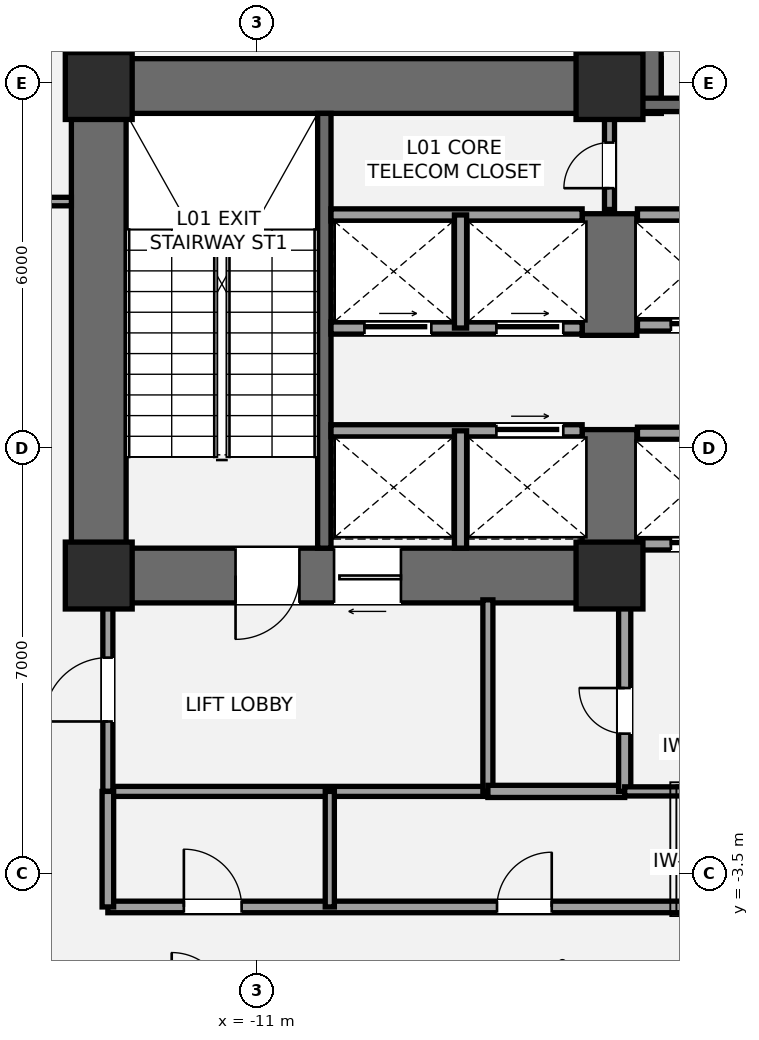
"""IFC4 building model, lengths in metres.
Left out: names, types, materials, properties, quantities, classifications, styles, units other than length and angle.
Written with IfcOpenShell. Run it as: python <this file> out.ifc"""

import sys

from ifc_helpers import new_model, si_unit, direction, frame, frame_2d, origin, origin_2d, place, context, subcontext, project, spatial, rectangle, extrude, element, fill, save


model = new_model("IFC4")
c1 = context("Model", 3, precision=1e-05, world=origin(), true_north=direction((0.0, 1.0)))
c2 = subcontext(c1, "Body", "Model", "MODEL_VIEW")
j1 = project(units=[si_unit("LENGTHUNIT", "METRE"), si_unit("PLANEANGLEUNIT", "RADIAN")], contexts=[c1])
p1 = place(None, origin())
s1 = spatial("IfcSite", under=j1, at=p1, CompositionType="ELEMENT")
p2 = place(p1, origin())
s2 = spatial("IfcBuilding", under=s1, at=p2, CompositionType="ELEMENT")
p3 = place(p2, frame((0.0, 0.0, 6.0)))
s3 = spatial("IfcBuildingStorey", under=s2, at=p3, CompositionType="ELEMENT", Elevation=6.0)
p4 = place(p3, frame((-13.6, 0.95, 0.0), z_axis=(0.0, 0.0, 1.0), x_axis=(0.0, 1.0, 0.0)))
e1 = element("IfcWall", 1, at=p4, inside=s3, PredefinedType="SHEAR", context=c2, shape_type="SweptSolid", body=[
    extrude(rectangle(XDim=8.95, YDim=0.9, at=frame_2d((4.475, 0.0))), origin(), (0.0, 0.0, 1.0), 4.2),
])
p5 = place(p3, frame((-14.05, 9.45, 0.0), z_axis=(0.0, 0.0, 1.0), x_axis=(1.0, 0.0, 0.0)))
e2 = element("IfcWall", 2, at=p5, inside=s3, PredefinedType="SHEAR", context=c2, shape_type="SweptSolid", body=[
    extrude(rectangle(XDim=9.7, YDim=0.9, at=frame_2d((4.85, 0.0))), origin(), (0.0, 0.0, 1.0), 4.2),
])
p6 = place(p3, frame((-4.75, 1.4, 0.0), z_axis=(0.0, 0.0, 1.0), x_axis=(-1.0, 0.0, 0.0)))
e3 = element("IfcWall", 3, at=p6, inside=s3, PredefinedType="SHEAR", context=c2, shape_type="SweptSolid", body=[
    extrude(rectangle(XDim=9.3, YDim=0.9, at=frame_2d((4.65, 0.0))), origin(), (0.0, 0.0, 1.0), 4.2),
])
p7 = place(p6, frame((5.55, 0.0, 0.0)))
e4 = element("IfcOpeningElement", 4, at=p7, cuts=e3, PredefinedType="OPENING", context=c2, shape_type="SweptSolid", body=[
    extrude(rectangle(XDim=1.05, YDim=2.15, at=frame_2d((0.525, 1.075))), frame((0.0, 0.46, 0.0), z_axis=(0.0, -1.0, 0.0), x_axis=(1.0, 0.0, 0.0)), (0.0, 0.0, 1.0), 0.92),
])
p8 = place(p6, frame((3.88, 0.0, 0.0)))
e5 = element("IfcOpeningElement", 5, at=p8, cuts=e3, PredefinedType="OPENING", context=c2, shape_type="SweptSolid", body=[
    extrude(rectangle(XDim=1.1, YDim=2.2, at=frame_2d((0.55, 1.1))), frame((0.0, 0.46, 0.0), z_axis=(0.0, -1.0, 0.0), x_axis=(1.0, 0.0, 0.0)), (0.0, 0.0, 1.0), 0.92),
])
p9 = place(p3, frame((-5.2, 0.95, 0.0), z_axis=(0.0, 0.0, 1.0), x_axis=(0.0, 1.0, 0.0)))
e6 = element("IfcWall", 6, at=p9, inside=s3, PredefinedType="SHEAR", context=c2, shape_type="SweptSolid", body=[
    extrude(rectangle(XDim=2.85, YDim=0.9, at=frame_2d((1.425, 0.0))), origin(), (0.0, 0.0, 1.0), 4.2),
])
p10 = place(p3, frame((-5.2, 5.35, 0.0), z_axis=(0.0, 0.0, 1.0), x_axis=(0.0, 1.0, 0.0)))
e7 = element("IfcWall", 7, at=p10, inside=s3, PredefinedType="SHEAR", context=c2, shape_type="SweptSolid", body=[
    extrude(rectangle(XDim=2.0, YDim=0.9, at=frame_2d((1.0, 0.0))), origin(), (0.0, 0.0, 1.0), 4.2),
])
p11 = place(p3, frame((-9.89, 1.85, 0.0), z_axis=(0.0, 0.0, 1.0), x_axis=(0.0, 1.0, 0.0)))
e8 = element("IfcWall", 8, at=p11, inside=s3, PredefinedType="SHEAR", context=c2, shape_type="SweptSolid", body=[
    extrude(rectangle(XDim=7.15, YDim=0.22, at=frame_2d((3.575, 0.0))), origin(), (0.0, 0.0, 1.0), 4.2),
])
p12 = place(p3, frame((-4.8, 9.0, 0.0), z_axis=(0.0, 0.0, 1.0), x_axis=(0.0, 1.0, 0.0)))
e9 = element("IfcWall", 9, at=p12, inside=s3, PredefinedType="SHEAR", context=c2, shape_type="SweptSolid", body=[
    extrude(rectangle(XDim=4.3, YDim=0.9, at=frame_2d((2.15, 0.0))), origin(), (0.0, 0.0, 1.0), 4.2),
])
p13 = place(p3, frame((-4.7, 9.14, 0.0), z_axis=(0.0, 0.0, 1.0), x_axis=(1.0, 0.0, 0.0)))
e10 = element("IfcWall", 10, at=p13, inside=s3, PredefinedType="SHEAR", context=c2, shape_type="SweptSolid", body=[
    extrude(rectangle(XDim=9.3, YDim=0.22, at=frame_2d((4.65, 0.0))), origin(), (0.0, 0.0, 1.0), 4.2),
])
p14 = place(p13, frame((1.15, 0.0, 0.0)))
e11 = element("IfcOpeningElement", 11, at=p14, cuts=e10, PredefinedType="OPENING", context=c2, shape_type="SweptSolid", body=[
    extrude(rectangle(XDim=1.05, YDim=2.15, at=frame_2d((0.525, 1.075))), frame((0.0, 0.12, 0.0), z_axis=(0.0, -1.0, 0.0), x_axis=(1.0, 0.0, 0.0)), (0.0, 0.0, 1.0), 0.24),
])
for number, where, z_axis, x_axis in (
    (12, (-13.6, 1.4, 0.0), (0.0, 0.0, 1.0), (1.0, 0.0, 0.0)),
    (13, (-13.6, 9.45, 0.0), (0.0, 0.0, 1.0), (1.0, 0.0, 0.0)),
    (14, (-5.2, 1.4, 0.0), (0.0, 0.0, 1.0), (1.0, 0.0, 0.0)),
    (15, (-5.2, 9.45, 0.0), (0.0, 0.0, 1.0), (1.0, 0.0, 0.0)),
):
    element("IfcColumn", number, at=place(p3, frame(where, z_axis=z_axis, x_axis=x_axis)), inside=s3, PredefinedType="COLUMN", context=c2, shape_type="SweptSolid", body=[
        extrude(rectangle(XDim=1.1, YDim=1.1, at=origin_2d()), origin(), (0.0, 0.0, 1.0), 4.2),
    ])
p15 = place(p3, frame((-13.45, -2.15, 0.0), z_axis=(0.0, 0.0, 1.0), x_axis=(1.0, 0.0, 0.0)))
e16 = element("IfcWall", 16, at=p15, inside=s3, PredefinedType="PARTITIONING", context=c2, shape_type="SweptSolid", body=[
    extrude(rectangle(XDim=6.25, YDim=0.165, at=frame_2d((3.125, 0.0))), origin(), (0.0, 0.0, 1.0), 3.98),
])
p16 = place(p3, frame((-13.45, -2.15, 0.0), z_axis=(0.0, 0.0, 1.0), x_axis=(0.0, 1.0, 0.0)))
e17 = element("IfcWall", 17, at=p16, inside=s3, PredefinedType="PARTITIONING", context=c2, shape_type="SweptSolid", body=[
    extrude(rectangle(XDim=3.15, YDim=0.165, at=frame_2d((1.575, 0.0))), origin(), (0.0, 0.0, 1.0), 3.433),
])
p17 = place(p16, frame((1.15, 0.0, 0.0)))
e18 = element("IfcOpeningElement", 18, at=p17, cuts=e17, PredefinedType="OPENING", context=c2, shape_type="SweptSolid", body=[
    extrude(rectangle(XDim=1.05, YDim=2.15, at=frame_2d((0.525, 1.075))), frame((0.0, 0.093, 0.0), z_axis=(0.0, -1.0, 0.0), x_axis=(1.0, 0.0, 0.0)), (0.0, 0.0, 1.0), 0.185),
])
p18 = place(p3, frame((-7.2, -2.15, 0.0), z_axis=(0.0, 0.0, 1.0), x_axis=(0.0, 1.0, 0.0)))
e19 = element("IfcWall", 19, at=p18, inside=s3, PredefinedType="PARTITIONING", context=c2, shape_type="SweptSolid", body=[
    extrude(rectangle(XDim=3.15, YDim=0.165, at=frame_2d((1.575, 0.0))), origin(), (0.0, 0.0, 1.0), 3.98),
])
p19 = place(p3, frame((-7.2, -2.15, 0.0), z_axis=(0.0, 0.0, 1.0), x_axis=(1.0, 0.0, 0.0)))
e20 = element("IfcWall", 20, at=p19, inside=s3, PredefinedType="SOLIDWALL", context=c2, shape_type="SweptSolid", body=[
    extrude(rectangle(XDim=2.25, YDim=0.2, at=frame_2d((1.125, 0.0))), origin(), (0.0, 0.0, 1.0), 3.98),
])
p20 = place(p3, frame((-4.95, -2.15, 0.0), z_axis=(0.0, 0.0, 1.0), x_axis=(0.0, 1.0, 0.0)))
e21 = element("IfcWall", 21, at=p20, inside=s3, PredefinedType="SOLIDWALL", context=c2, shape_type="SweptSolid", body=[
    extrude(rectangle(XDim=3.15, YDim=0.2, at=frame_2d((1.575, 0.0))), origin(), (0.0, 0.0, 1.0), 3.348),
])
p21 = place(p20, frame((0.95, 0.0, 0.0)))
e22 = element("IfcOpeningElement", 22, at=p21, cuts=e21, PredefinedType="OPENING", context=c2, shape_type="SweptSolid", body=[
    extrude(rectangle(XDim=0.75, YDim=2.1, at=frame_2d((0.375, 1.05))), frame((0.0, 0.11, 0.0), z_axis=(0.0, -1.0, 0.0), x_axis=(1.0, 0.0, 0.0)), (0.0, 0.0, 1.0), 0.22),
])
p22 = place(p3, frame((-9.78, 3.78, 0.0), z_axis=(0.0, 0.0, 1.0), x_axis=(1.0, 0.0, 0.0)))
e23 = element("IfcWall", 23, at=p22, inside=s3, PredefinedType="SOLIDWALL", context=c2, shape_type="SweptSolid", body=[
    extrude(rectangle(XDim=4.13, YDim=0.2, at=frame_2d((2.065, 0.0))), origin(), (0.0, 0.0, 1.0), 3.98),
])
p23 = place(p22, frame((2.72, 0.0, 0.0)))
e24 = element("IfcOpeningElement", 24, at=p23, cuts=e23, PredefinedType="OPENING", context=c2, shape_type="SweptSolid", body=[
    extrude(rectangle(XDim=1.1, YDim=2.2, at=frame_2d((0.55, 1.1))), frame((0.0, 0.11, 0.0), z_axis=(0.0, -1.0, 0.0), x_axis=(1.0, 0.0, 0.0)), (0.0, 0.0, 1.0), 0.22),
])
p24 = place(p3, frame((-7.65, 1.85, 0.0), z_axis=(0.0, 0.0, 1.0), x_axis=(0.0, 1.0, 0.0)))
e25 = element("IfcWall", 25, at=p24, inside=s3, PredefinedType="SOLIDWALL", context=c2, shape_type="SweptSolid", body=[
    extrude(rectangle(XDim=1.93, YDim=0.2, at=frame_2d((0.965, 0.0))), origin(), (0.0, 0.0, 1.0), 3.98),
])
p25 = place(p3, frame((-9.78, 5.47, 0.0), z_axis=(0.0, 0.0, 1.0), x_axis=(1.0, 0.0, 0.0)))
e26 = element("IfcWall", 26, at=p25, inside=s3, PredefinedType="SOLIDWALL", context=c2, shape_type="SweptSolid", body=[
    extrude(rectangle(XDim=4.13, YDim=0.2, at=frame_2d((2.065, 0.0))), origin(), (0.0, 0.0, 1.0), 3.98),
])
p26 = place(p25, frame((0.55, 0.0, 0.0)))
e27 = element("IfcOpeningElement", 27, at=p26, cuts=e26, PredefinedType="OPENING", context=c2, shape_type="SweptSolid", body=[
    extrude(rectangle(XDim=1.1, YDim=2.2, at=frame_2d((0.55, 1.1))), frame((0.0, 0.11, 0.0), z_axis=(0.0, -1.0, 0.0), x_axis=(1.0, 0.0, 0.0)), (0.0, 0.0, 1.0), 0.22),
])
p27 = place(p25, frame((2.72, 0.0, 0.0)))
e28 = element("IfcOpeningElement", 28, at=p27, cuts=e26, PredefinedType="OPENING", context=c2, shape_type="SweptSolid", body=[
    extrude(rectangle(XDim=1.1, YDim=2.2, at=frame_2d((0.55, 1.1))), frame((0.0, 0.11, 0.0), z_axis=(0.0, -1.0, 0.0), x_axis=(1.0, 0.0, 0.0)), (0.0, 0.0, 1.0), 0.22),
])
p28 = place(p3, frame((-9.78, 7.33, 0.0), z_axis=(0.0, 0.0, 1.0), x_axis=(1.0, 0.0, 0.0)))
e29 = element("IfcWall", 29, at=p28, inside=s3, PredefinedType="SOLIDWALL", context=c2, shape_type="SweptSolid", body=[
    extrude(rectangle(XDim=4.13, YDim=0.2, at=frame_2d((2.065, 0.0))), origin(), (0.0, 0.0, 1.0), 3.98),
])
p29 = place(p3, frame((-7.65, 5.47, 0.0), z_axis=(0.0, 0.0, 1.0), x_axis=(0.0, 1.0, 0.0)))
e30 = element("IfcWall", 30, at=p29, inside=s3, PredefinedType="SOLIDWALL", context=c2, shape_type="SweptSolid", body=[
    extrude(rectangle(XDim=1.86, YDim=0.2, at=frame_2d((0.93, 0.0))), origin(), (0.0, 0.0, 1.0), 3.98),
])
p30 = place(p3, frame((-4.74, 1.92, 0.0), z_axis=(0.0, 0.0, 1.0), x_axis=(1.0, 0.0, 0.0)))
e31 = element("IfcWall", 31, at=p30, inside=s3, PredefinedType="SOLIDWALL", context=c2, shape_type="SweptSolid", body=[
    extrude(rectangle(XDim=3.86, YDim=0.2, at=frame_2d((1.93, 0.0))), origin(), (0.0, 0.0, 1.0), 2.97),
])
p31 = place(p30, frame((0.55, 0.0, 0.0)))
e32 = element("IfcOpeningElement", 32, at=p31, cuts=e31, PredefinedType="OPENING", context=c2, shape_type="SweptSolid", body=[
    extrude(rectangle(XDim=1.1, YDim=2.2, at=frame_2d((0.55, 1.1))), frame((0.0, 0.11, 0.0), z_axis=(0.0, -1.0, 0.0), x_axis=(1.0, 0.0, 0.0)), (0.0, 0.0, 1.0), 0.22),
])
p32 = place(p30, frame((2.55, 0.0, 0.0)))
e33 = element("IfcOpeningElement", 33, at=p32, cuts=e31, PredefinedType="OPENING", context=c2, shape_type="SweptSolid", body=[
    extrude(rectangle(XDim=1.1, YDim=2.2, at=frame_2d((0.55, 1.1))), frame((0.0, 0.11, 0.0), z_axis=(0.0, -1.0, 0.0), x_axis=(1.0, 0.0, 0.0)), (0.0, 0.0, 1.0), 0.22),
])
p33 = place(p3, frame((-4.74, 3.74, 0.0), z_axis=(0.0, 0.0, 1.0), x_axis=(1.0, 0.0, 0.0)))
e34 = element("IfcWall", 34, at=p33, inside=s3, PredefinedType="SOLIDWALL", context=c2, shape_type="SweptSolid", body=[
    extrude(rectangle(XDim=3.86, YDim=0.2, at=frame_2d((1.93, 0.0))), origin(), (0.0, 0.0, 1.0), 3.98),
])
p34 = place(p3, frame((-4.74, 5.52, 0.0), z_axis=(0.0, 0.0, 1.0), x_axis=(1.0, 0.0, 0.0)))
e35 = element("IfcWall", 35, at=p34, inside=s3, PredefinedType="SOLIDWALL", context=c2, shape_type="SweptSolid", body=[
    extrude(rectangle(XDim=3.86, YDim=0.2, at=frame_2d((1.93, 0.0))), origin(), (0.0, 0.0, 1.0), 3.98),
])
p35 = place(p34, frame((0.55, 0.0, 0.0)))
e36 = element("IfcOpeningElement", 36, at=p35, cuts=e35, PredefinedType="OPENING", context=c2, shape_type="SweptSolid", body=[
    extrude(rectangle(XDim=1.1, YDim=2.2, at=frame_2d((0.55, 1.1))), frame((0.0, 0.11, 0.0), z_axis=(0.0, -1.0, 0.0), x_axis=(1.0, 0.0, 0.0)), (0.0, 0.0, 1.0), 0.22),
])
p36 = place(p34, frame((2.3, 0.0, 0.0)))
e37 = element("IfcOpeningElement", 37, at=p36, cuts=e35, PredefinedType="OPENING", context=c2, shape_type="SweptSolid", body=[
    extrude(rectangle(XDim=1.1, YDim=2.2, at=frame_2d((0.55, 1.1))), frame((0.0, 0.11, 0.0), z_axis=(0.0, -1.0, 0.0), x_axis=(1.0, 0.0, 0.0)), (0.0, 0.0, 1.0), 0.22),
])
p37 = place(p3, frame((-4.74, 7.33, 0.0), z_axis=(0.0, 0.0, 1.0), x_axis=(1.0, 0.0, 0.0)))
e38 = element("IfcWall", 38, at=p37, inside=s3, PredefinedType="SOLIDWALL", context=c2, shape_type="SweptSolid", body=[
    extrude(rectangle(XDim=3.86, YDim=0.2, at=frame_2d((1.93, 0.0))), origin(), (0.0, 0.0, 1.0), 3.98),
])
p38 = place(p3, frame((-5.2, 7.42, 0.0), z_axis=(0.0, 0.0, 1.0), x_axis=(0.0, 1.0, 0.0)))
e39 = element("IfcWall", 39, at=p38, inside=s3, PredefinedType="PARTITIONING", context=c2, shape_type="SweptSolid", body=[
    extrude(rectangle(XDim=1.58, YDim=0.165, at=frame_2d((0.79, 0.0))), origin(), (0.0, 0.0, 1.0), 3.98),
])
p39 = place(p38, frame((0.35, 0.0, 0.0)))
e40 = element("IfcOpeningElement", 40, at=p39, cuts=e39, PredefinedType="OPENING", context=c2, shape_type="SweptSolid", body=[
    extrude(rectangle(XDim=0.75, YDim=2.1, at=frame_2d((0.375, 1.05))), frame((0.0, 0.093, 0.0), z_axis=(0.0, -1.0, 0.0), x_axis=(1.0, 0.0, 0.0)), (0.0, 0.0, 1.0), 0.185),
])
p40 = place(p3, frame((-13.45, -4.05, 0.0), z_axis=(0.0, 0.0, 1.0), x_axis=(1.0, 0.0, 0.0)))
e41 = element("IfcWall", 41, at=p40, inside=s3, PredefinedType="PLUMBINGWALL", context=c2, shape_type="SweptSolid", body=[
    extrude(rectangle(XDim=11.35, YDim=0.19, at=frame_2d((5.675, 0.0))), origin(), (0.0, 0.0, 1.0), 3.507),
])
p41 = place(p40, frame((1.25, 0.0, 0.0)))
e42 = element("IfcOpeningElement", 42, at=p41, cuts=e41, PredefinedType="OPENING", context=c2, shape_type="SweptSolid", body=[
    extrude(rectangle(XDim=0.95, YDim=2.15, at=frame_2d((0.475, 1.075))), frame((0.0, 0.105, 0.0), z_axis=(0.0, -1.0, 0.0), x_axis=(1.0, 0.0, 0.0)), (0.0, 0.0, 1.0), 0.21),
])
p42 = place(p40, frame((6.4, 0.0, 0.0)))
e43 = element("IfcOpeningElement", 43, at=p42, cuts=e41, PredefinedType="OPENING", context=c2, shape_type="SweptSolid", body=[
    extrude(rectangle(XDim=0.9, YDim=2.1, at=frame_2d((0.45, 1.05))), frame((0.0, 0.105, 0.0), z_axis=(0.0, -1.0, 0.0), x_axis=(1.0, 0.0, 0.0)), (0.0, 0.0, 1.0), 0.21),
])
p43 = place(p3, frame((-4.95, -2.15, 0.0), z_axis=(0.0, 0.0, 1.0), x_axis=(1.0, 0.0, 0.0)))
e44 = element("IfcWall", 44, at=p43, inside=s3, PredefinedType="PLUMBINGWALL", context=c2, shape_type="SweptSolid", body=[
    extrude(rectangle(XDim=2.85, YDim=0.15, at=frame_2d((1.425, 0.0))), origin(), (0.0, 0.0, 1.0), 3.98),
])
p44 = place(p3, frame((-13.45, -4.05, 0.0), z_axis=(0.0, 0.0, 1.0), x_axis=(0.0, 1.0, 0.0)))
e45 = element("IfcWall", 45, at=p44, inside=s3, PredefinedType="PLUMBINGWALL", context=c2, shape_type="SweptSolid", body=[
    extrude(rectangle(XDim=1.9, YDim=0.19, at=frame_2d((0.95, 0.0))), origin(), (0.0, 0.0, 1.0), 3.98),
])
p45 = place(p3, frame((-9.8, -4.05, 0.0), z_axis=(0.0, 0.0, 1.0), x_axis=(0.0, 1.0, 0.0)))
e46 = element("IfcWall", 46, at=p45, inside=s3, PredefinedType="PLUMBINGWALL", context=c2, shape_type="SweptSolid", body=[
    extrude(rectangle(XDim=1.9, YDim=0.15, at=frame_2d((0.95, 0.0))), origin(), (0.0, 0.0, 1.0), 3.98),
])
p46 = place(p3, frame((-16.4, 7.55, 0.0), z_axis=(0.0, 0.0, 1.0), x_axis=(1.0, 0.0, 0.0)))
e47 = element("IfcWall", 47, at=p46, inside=s3, PredefinedType="PARTITIONING", context=c2, shape_type="SweptSolid", body=[
    extrude(rectangle(XDim=2.35, YDim=0.14, at=frame_2d((1.175, 0.0))), origin(), (0.0, 0.0, 1.0), 3.433),
])
p47 = place(p46, frame((0.32, 0.0, 0.0)))
e48 = element("IfcOpeningElement", 48, at=p47, cuts=e47, PredefinedType="OPENING", context=c2, shape_type="SweptSolid", body=[
    extrude(rectangle(XDim=0.92, YDim=2.15, at=frame_2d((0.46, 1.075))), frame((0.0, 0.08, 0.0), z_axis=(0.0, -1.0, 0.0), x_axis=(1.0, 0.0, 0.0)), (0.0, 0.0, 1.0), 0.16),
])
p48 = place(p7, origin())
e49 = element("IfcDoor", 49, at=p48, inside=s3, OperationType="SINGLE_SWING_RIGHT", PredefinedType="DOOR", context=c2, shape_type="SweptSolid", body=[
    extrude(rectangle(XDim=1.05, YDim=2.15, at=frame_2d((0.525, 1.075))), frame((0.0, 0.025, 0.0), z_axis=(0.0, -1.0, 0.0), x_axis=(1.0, 0.0, 0.0)), (0.0, 0.0, 1.0), 0.05),
])
fill(e4, e49)
p49 = place(p17, origin())
e50 = element("IfcDoor", 50, at=p49, inside=s3, OperationType="SINGLE_SWING_LEFT", PredefinedType="DOOR", context=c2, shape_type="SweptSolid", body=[
    extrude(rectangle(XDim=1.05, YDim=2.15, at=frame_2d((0.525, 1.075))), frame((0.0, 0.025, 0.0), z_axis=(0.0, -1.0, 0.0), x_axis=(1.0, 0.0, 0.0)), (0.0, 0.0, 1.0), 0.05),
])
fill(e18, e50)
p50 = place(p21, origin())
e51 = element("IfcDoor", 51, at=p50, inside=s3, OperationType="SINGLE_SWING_RIGHT", PredefinedType="DOOR", context=c2, shape_type="SweptSolid", body=[
    extrude(rectangle(XDim=0.75, YDim=2.1, at=frame_2d((0.375, 1.05))), frame((0.0, 0.025, 0.0), z_axis=(0.0, -1.0, 0.0), x_axis=(1.0, 0.0, 0.0)), (0.0, 0.0, 1.0), 0.05),
])
fill(e22, e51)
p51 = place(p8, origin())
e52 = element("IfcDoor", 52, at=p51, inside=s3, OperationType="SLIDING_TO_LEFT", PredefinedType="DOOR", context=c2, shape_type="SweptSolid", body=[
    extrude(rectangle(XDim=1.1, YDim=2.2, at=frame_2d((0.55, 1.1))), frame((0.0, 0.025, 0.0), z_axis=(0.0, -1.0, 0.0), x_axis=(1.0, 0.0, 0.0)), (0.0, 0.0, 1.0), 0.05),
])
fill(e5, e52)
p52 = place(p26, origin())
e53 = element("IfcDoor", 53, at=p52, inside=s3, OperationType="SLIDING_TO_LEFT", PredefinedType="DOOR", context=c2, shape_type="SweptSolid", body=[
    extrude(rectangle(XDim=1.1, YDim=2.2, at=frame_2d((0.55, 1.1))), frame((0.0, 0.025, 0.0), z_axis=(0.0, -1.0, 0.0), x_axis=(1.0, 0.0, 0.0)), (0.0, 0.0, 1.0), 0.05),
])
fill(e27, e53)
p53 = place(p27, origin())
e54 = element("IfcDoor", 54, at=p53, inside=s3, OperationType="SLIDING_TO_LEFT", PredefinedType="DOOR", context=c2, shape_type="SweptSolid", body=[
    extrude(rectangle(XDim=1.1, YDim=2.2, at=frame_2d((0.55, 1.1))), frame((0.0, 0.025, 0.0), z_axis=(0.0, -1.0, 0.0), x_axis=(1.0, 0.0, 0.0)), (0.0, 0.0, 1.0), 0.05),
])
fill(e28, e54)
p54 = place(p23, origin())
e55 = element("IfcDoor", 55, at=p54, inside=s3, OperationType="SLIDING_TO_LEFT", PredefinedType="DOOR", context=c2, shape_type="SweptSolid", body=[
    extrude(rectangle(XDim=1.1, YDim=2.2, at=frame_2d((0.55, 1.1))), frame((0.0, 0.025, 0.0), z_axis=(0.0, -1.0, 0.0), x_axis=(1.0, 0.0, 0.0)), (0.0, 0.0, 1.0), 0.05),
])
fill(e24, e55)
p55 = place(p31, origin())
e56 = element("IfcDoor", 56, at=p55, inside=s3, OperationType="SLIDING_TO_LEFT", PredefinedType="DOOR", context=c2, shape_type="SweptSolid", body=[
    extrude(rectangle(XDim=1.1, YDim=2.2, at=frame_2d((0.55, 1.1))), frame((0.0, 0.025, 0.0), z_axis=(0.0, -1.0, 0.0), x_axis=(1.0, 0.0, 0.0)), (0.0, 0.0, 1.0), 0.05),
])
fill(e32, e56)
p56 = place(p35, origin())
e57 = element("IfcDoor", 57, at=p56, inside=s3, OperationType="SLIDING_TO_LEFT", PredefinedType="DOOR", context=c2, shape_type="SweptSolid", body=[
    extrude(rectangle(XDim=1.1, YDim=2.2, at=frame_2d((0.55, 1.1))), frame((0.0, 0.025, 0.0), z_axis=(0.0, -1.0, 0.0), x_axis=(1.0, 0.0, 0.0)), (0.0, 0.0, 1.0), 0.05),
])
fill(e36, e57)
p57 = place(p39, origin())
e58 = element("IfcDoor", 58, at=p57, inside=s3, OperationType="SINGLE_SWING_LEFT", PredefinedType="DOOR", context=c2, shape_type="SweptSolid", body=[
    extrude(rectangle(XDim=0.75, YDim=2.1, at=frame_2d((0.375, 1.05))), frame((0.0, 0.025, 0.0), z_axis=(0.0, -1.0, 0.0), x_axis=(1.0, 0.0, 0.0)), (0.0, 0.0, 1.0), 0.05),
])
fill(e40, e58)
p58 = place(p41, origin())
e59 = element("IfcDoor", 59, at=p58, inside=s3, OperationType="SINGLE_SWING_LEFT", PredefinedType="DOOR", context=c2, shape_type="SweptSolid", body=[
    extrude(rectangle(XDim=0.95, YDim=2.15, at=frame_2d((0.475, 1.075))), frame((0.0, 0.025, 0.0), z_axis=(0.0, -1.0, 0.0), x_axis=(1.0, 0.0, 0.0)), (0.0, 0.0, 1.0), 0.05),
])
fill(e42, e59)
p59 = place(p42, origin())
e60 = element("IfcDoor", 60, at=p59, inside=s3, OperationType="SINGLE_SWING_RIGHT", PredefinedType="DOOR", context=c2, shape_type="SweptSolid", body=[
    extrude(rectangle(XDim=0.9, YDim=2.1, at=frame_2d((0.45, 1.05))), frame((0.0, 0.025, 0.0), z_axis=(0.0, -1.0, 0.0), x_axis=(1.0, 0.0, 0.0)), (0.0, 0.0, 1.0), 0.05),
])
fill(e43, e60)
save(model, sys.argv[1])
